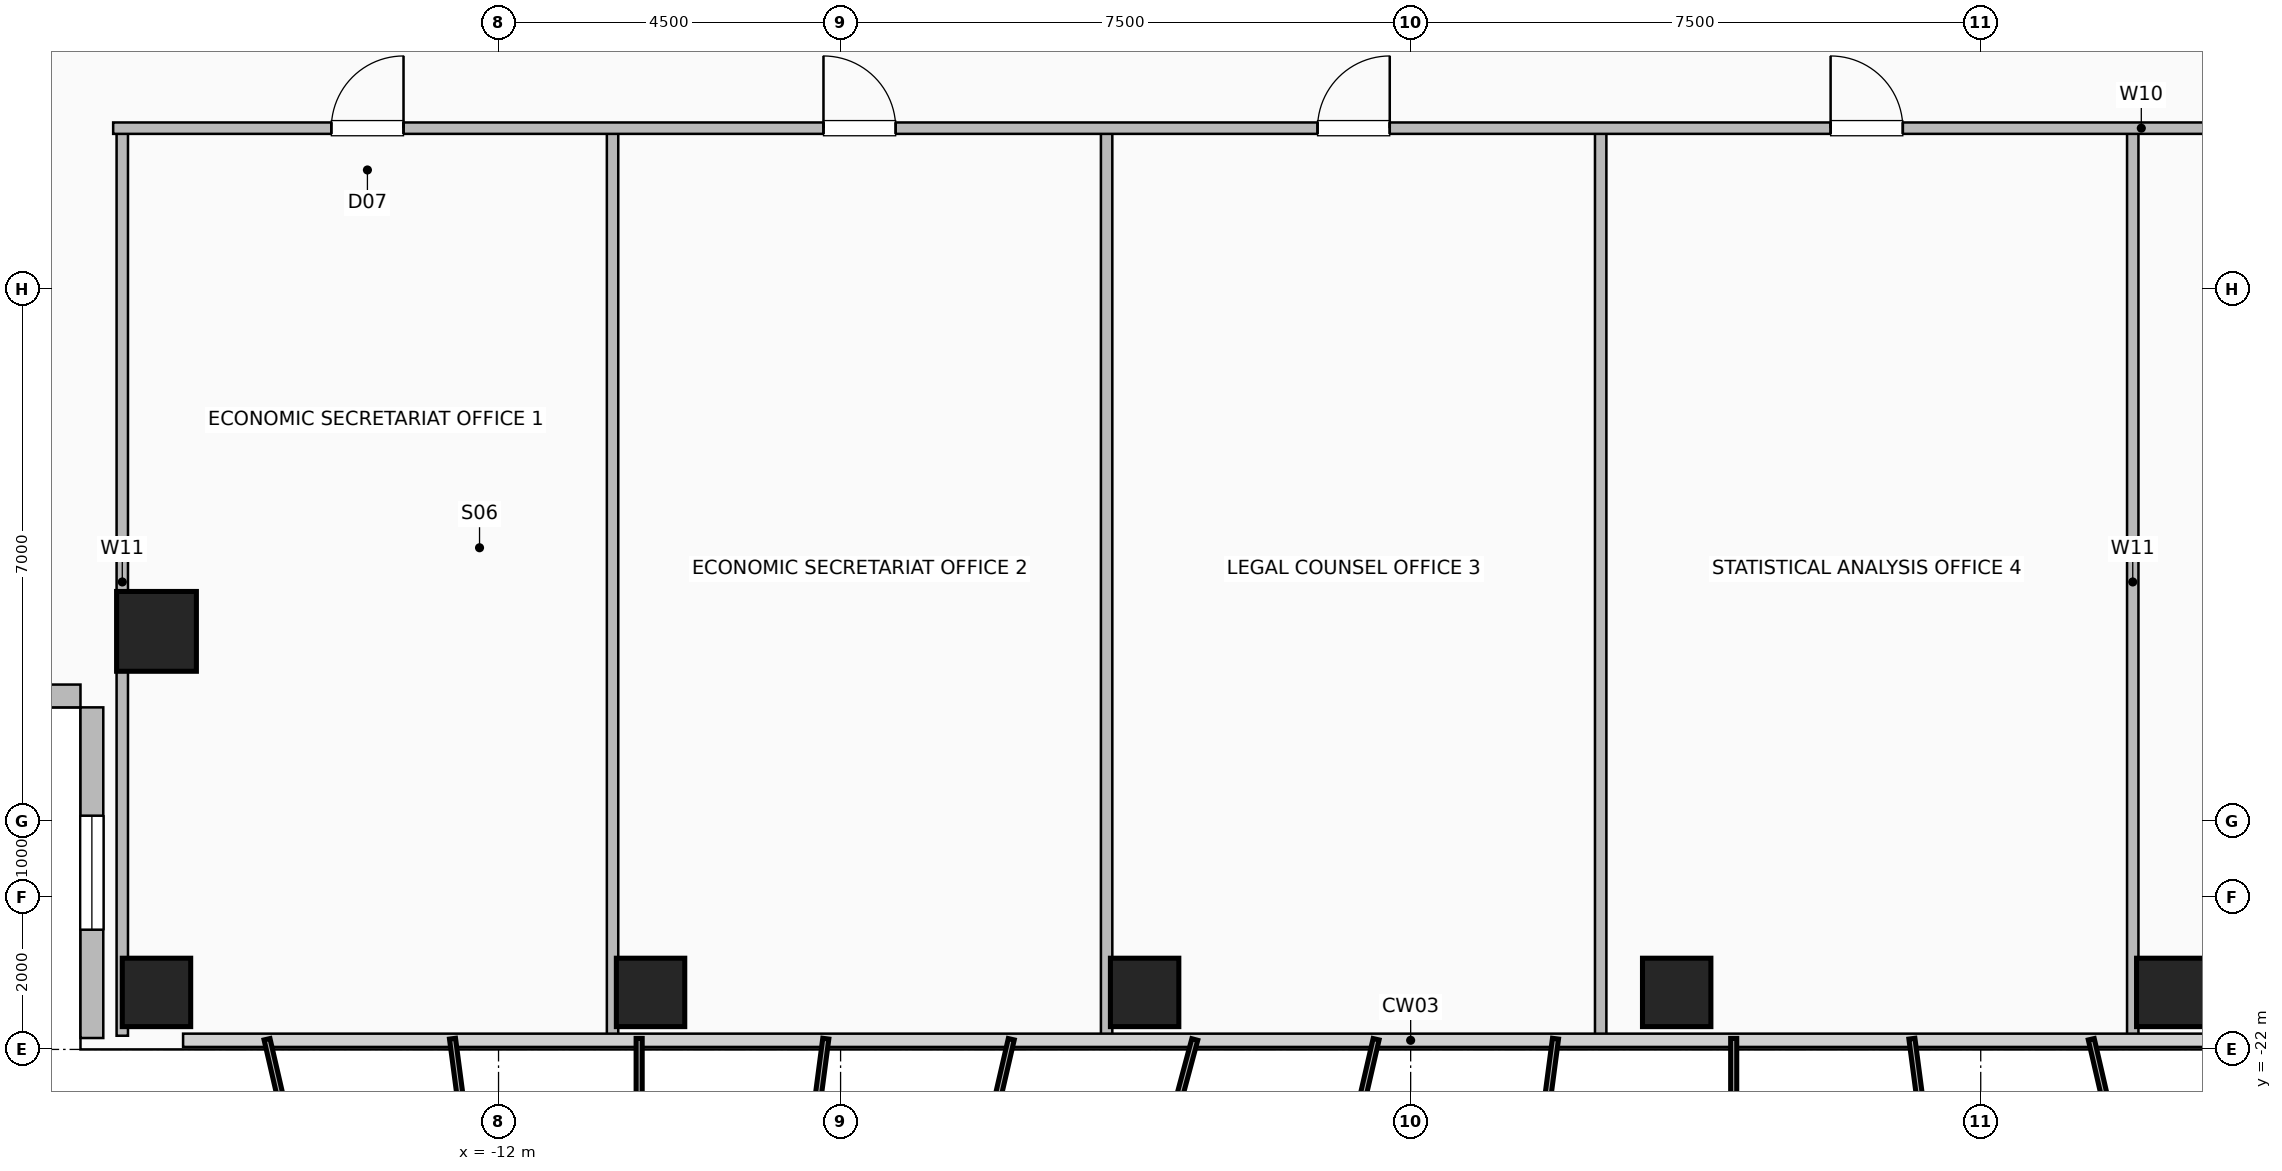
"""IFC4 building model, lengths in metres.
Left out: names, types, materials, properties, quantities, classifications, styles, units other than length and angle.
Written with IfcOpenShell. Run it as: python <this file> out.ifc"""

import sys

from ifc_helpers import new_model, si_unit, direction, frame, frame_2d, origin, origin_2d, place, context, subcontext, project, spatial, rectangle, hollow_rectangle, extrude, element, fill, save


model = new_model("IFC4")
c1 = context("Model", 3, precision=1e-05, world=origin(), true_north=direction((0.0, 1.0)))
c2 = subcontext(c1, "Body", "Model", "MODEL_VIEW")
j1 = project(units=[si_unit("LENGTHUNIT", "METRE"), si_unit("PLANEANGLEUNIT", "RADIAN")], contexts=[c1])
p1 = place(None, origin())
s1 = spatial("IfcSite", under=j1, at=p1, CompositionType="ELEMENT")
p2 = place(p1, origin())
s2 = spatial("IfcBuilding", under=s1, at=p2, CompositionType="ELEMENT")
p3 = place(p2, frame((0.0, 0.0, 115.6)))
s3 = spatial("IfcBuildingStorey", under=s2, at=p3, CompositionType="ELEMENT", Elevation=115.6)
for number, where, z_axis, x_axis in (
    (1, (-16.5, -21.25, 0.0), (0.0, 0.0, 1.0), (1.0, 0.0, 0.0)),
    (2, (-10.0, -21.25, 0.0), (0.0, 0.0, 1.0), (1.0, 0.0, 0.0)),
    (3, (-3.5, -21.25, 0.0), (0.0, 0.0, 1.0), (1.0, 0.0, 0.0)),
    (4, (3.5, -21.25, 0.0), (0.0, 0.0, 1.0), (1.0, 0.0, 0.0)),
    (5, (10.0, -21.25, 0.0), (0.0, 0.0, 1.0), (1.0, 0.0, 0.0)),
):
    element("IfcColumn", number, at=place(p3, frame(where, z_axis=z_axis, x_axis=x_axis)), inside=s3, PredefinedType="COLUMN", context=c2, shape_type="SweptSolid", body=[
        extrude(hollow_rectangle(XDim=0.9, YDim=0.9, WallThickness=0.045, at=origin_2d()), origin(), (0.0, 0.0, 1.0), 3.6),
    ])
p4 = place(p3, frame((-16.5, -16.5, 0.0), z_axis=(0.0, 0.0, 1.0), x_axis=(1.0, 0.0, 0.0)))
e6 = element("IfcColumn", 6, at=p4, inside=s3, PredefinedType="COLUMN", context=c2, shape_type="SweptSolid", body=[
    extrude(hollow_rectangle(XDim=1.05, YDim=1.05, WallThickness=0.05, at=origin_2d()), origin(), (0.0, 0.0, 1.0), 3.6),
])
p5 = place(p3, frame((-17.35, -21.85, 0.0), z_axis=(0.0, 0.0, 1.0), x_axis=(0.0, 1.0, 0.0)))
e7 = element("IfcWall", 7, at=p5, inside=s3, PredefinedType="SOLIDWALL", context=c2, shape_type="SweptSolid", body=[
    extrude(rectangle(XDim=4.35, YDim=0.3, at=frame_2d((2.175, 0.0))), origin(), (0.0, 0.0, 1.0), 3.36),
])
p6 = place(p5, frame((1.425, 0.0, 0.9)))
e8 = element("IfcOpeningElement", 8, at=p6, cuts=e7, PredefinedType="OPENING", context=c2, shape_type="SweptSolid", body=[
    extrude(rectangle(XDim=1.5, YDim=1.8, at=frame_2d((0.75, 0.9))), frame((0.0, 0.16, 0.0), z_axis=(0.0, -1.0, 0.0), x_axis=(1.0, 0.0, 0.0)), (0.0, 0.0, 1.0), 0.32),
])
p7 = place(p3, frame((-21.85, -17.35, 0.0), z_axis=(0.0, 0.0, 1.0), x_axis=(1.0, 0.0, 0.0)))
e9 = element("IfcWall", 9, at=p7, inside=s3, PredefinedType="SOLIDWALL", context=c2, shape_type="SweptSolid", body=[
    extrude(rectangle(XDim=4.35, YDim=0.3, at=frame_2d((2.175, 0.0))), origin(), (0.0, 0.0, 1.0), 3.36),
])
for number, where, z_axis, x_axis in (
    (10, (-16.95, -21.82, 0.0), (0.0, 0.0, 1.0), (0.0, 1.0, 0.0)),
    (11, (-10.5, -21.82, 0.0), (0.0, 0.0, 1.0), (0.0, 1.0, 0.0)),
    (12, (-4.0, -21.82, 0.0), (0.0, 0.0, 1.0), (0.0, 1.0, 0.0)),
    (13, (2.5, -21.82, 0.0), (0.0, 0.0, 1.0), (0.0, 1.0, 0.0)),
    (14, (9.5, -21.82, 0.0), (0.0, 0.0, 1.0), (0.0, 1.0, 0.0)),
):
    element("IfcWall", number, at=place(p3, frame(where, z_axis=z_axis, x_axis=x_axis)), inside=s3, PredefinedType="PARTITIONING", context=c2, shape_type="SweptSolid", body=[
        extrude(rectangle(XDim=11.94, YDim=0.15, at=frame_2d((5.97, 0.0))), origin(), (0.0, 0.0, 1.0), 3.36),
    ])
p8 = place(p3, frame((-17.07, -9.88, 0.0), z_axis=(0.0, 0.0, 1.0), x_axis=(1.0, 0.0, 0.0)))
e15 = element("IfcWall", 15, at=p8, inside=s3, PredefinedType="PARTITIONING", context=c2, shape_type="SweptSolid", body=[
    extrude(rectangle(XDim=34.14, YDim=0.15, at=frame_2d((17.07, 0.0))), origin(), (0.0, 0.0, 1.0), 3.36),
])
p9 = place(p8, frame((2.87, 0.0, 0.0)))
e16 = element("IfcOpeningElement", 16, at=p9, cuts=e15, PredefinedType="OPENING", context=c2, shape_type="SweptSolid", body=[
    extrude(rectangle(XDim=0.95, YDim=2.06, at=frame_2d((0.475, 1.03))), frame((0.0, 0.085, 0.0), z_axis=(0.0, -1.0, 0.0), x_axis=(1.0, 0.0, 0.0)), (0.0, 0.0, 1.0), 0.17),
])
p10 = place(p8, frame((9.345, 0.0, 0.0)))
e17 = element("IfcOpeningElement", 17, at=p10, cuts=e15, PredefinedType="OPENING", context=c2, shape_type="SweptSolid", body=[
    extrude(rectangle(XDim=0.95, YDim=2.06, at=frame_2d((0.475, 1.03))), frame((0.0, 0.085, 0.0), z_axis=(0.0, -1.0, 0.0), x_axis=(1.0, 0.0, 0.0)), (0.0, 0.0, 1.0), 0.17),
])
p11 = place(p8, frame((15.845, 0.0, 0.0)))
e18 = element("IfcOpeningElement", 18, at=p11, cuts=e15, PredefinedType="OPENING", context=c2, shape_type="SweptSolid", body=[
    extrude(rectangle(XDim=0.95, YDim=2.06, at=frame_2d((0.475, 1.03))), frame((0.0, 0.085, 0.0), z_axis=(0.0, -1.0, 0.0), x_axis=(1.0, 0.0, 0.0)), (0.0, 0.0, 1.0), 0.17),
])
p12 = place(p8, frame((22.595, 0.0, 0.0)))
e19 = element("IfcOpeningElement", 19, at=p12, cuts=e15, PredefinedType="OPENING", context=c2, shape_type="SweptSolid", body=[
    extrude(rectangle(XDim=0.95, YDim=2.06, at=frame_2d((0.475, 1.03))), frame((0.0, 0.085, 0.0), z_axis=(0.0, -1.0, 0.0), x_axis=(1.0, 0.0, 0.0)), (0.0, 0.0, 1.0), 0.17),
])
p13 = place(p8, frame((29.82, 0.0, 0.0)))
e20 = element("IfcOpeningElement", 20, at=p13, cuts=e15, PredefinedType="OPENING", context=c2, shape_type="SweptSolid", body=[
    extrude(rectangle(XDim=0.95, YDim=2.06, at=frame_2d((0.475, 1.03))), frame((0.0, 0.085, 0.0), z_axis=(0.0, -1.0, 0.0), x_axis=(1.0, 0.0, 0.0)), (0.0, 0.0, 1.0), 0.17),
])
p14 = place(p6, origin())
e21 = element("IfcWindow", 21, at=p14, inside=s3, PartitioningType="SINGLE_PANEL", PredefinedType="WINDOW", context=c2, shape_type="SweptSolid", body=[
    extrude(rectangle(XDim=1.5, YDim=1.8, at=frame_2d((0.75, 0.9))), frame((0.0, 0.03, 0.0), z_axis=(0.0, -1.0, 0.0), x_axis=(1.0, 0.0, 0.0)), (0.0, 0.0, 1.0), 0.06),
])
fill(e8, e21)
p15 = place(p9, origin())
e22 = element("IfcDoor", 22, at=p15, inside=s3, OperationType="SINGLE_SWING_RIGHT", PredefinedType="DOOR", context=c2, shape_type="SweptSolid", body=[
    extrude(rectangle(XDim=0.95, YDim=2.06, at=frame_2d((0.475, 1.03))), frame((0.0, 0.025, 0.0), z_axis=(0.0, -1.0, 0.0), x_axis=(1.0, 0.0, 0.0)), (0.0, 0.0, 1.0), 0.05),
])
fill(e16, e22)
p16 = place(p10, origin())
e23 = element("IfcDoor", 23, at=p16, inside=s3, OperationType="SINGLE_SWING_LEFT", PredefinedType="DOOR", context=c2, shape_type="SweptSolid", body=[
    extrude(rectangle(XDim=0.95, YDim=2.06, at=frame_2d((0.475, 1.03))), frame((0.0, 0.025, 0.0), z_axis=(0.0, -1.0, 0.0), x_axis=(1.0, 0.0, 0.0)), (0.0, 0.0, 1.0), 0.05),
])
fill(e17, e23)
p17 = place(p11, origin())
e24 = element("IfcDoor", 24, at=p17, inside=s3, OperationType="SINGLE_SWING_RIGHT", PredefinedType="DOOR", context=c2, shape_type="SweptSolid", body=[
    extrude(rectangle(XDim=0.95, YDim=2.06, at=frame_2d((0.475, 1.03))), frame((0.0, 0.025, 0.0), z_axis=(0.0, -1.0, 0.0), x_axis=(1.0, 0.0, 0.0)), (0.0, 0.0, 1.0), 0.05),
])
fill(e18, e24)
p18 = place(p12, origin())
e25 = element("IfcDoor", 25, at=p18, inside=s3, OperationType="SINGLE_SWING_LEFT", PredefinedType="DOOR", context=c2, shape_type="SweptSolid", body=[
    extrude(rectangle(XDim=0.95, YDim=2.06, at=frame_2d((0.475, 1.03))), frame((0.0, 0.025, 0.0), z_axis=(0.0, -1.0, 0.0), x_axis=(1.0, 0.0, 0.0)), (0.0, 0.0, 1.0), 0.05),
])
fill(e19, e25)
save(model, sys.argv[1])
